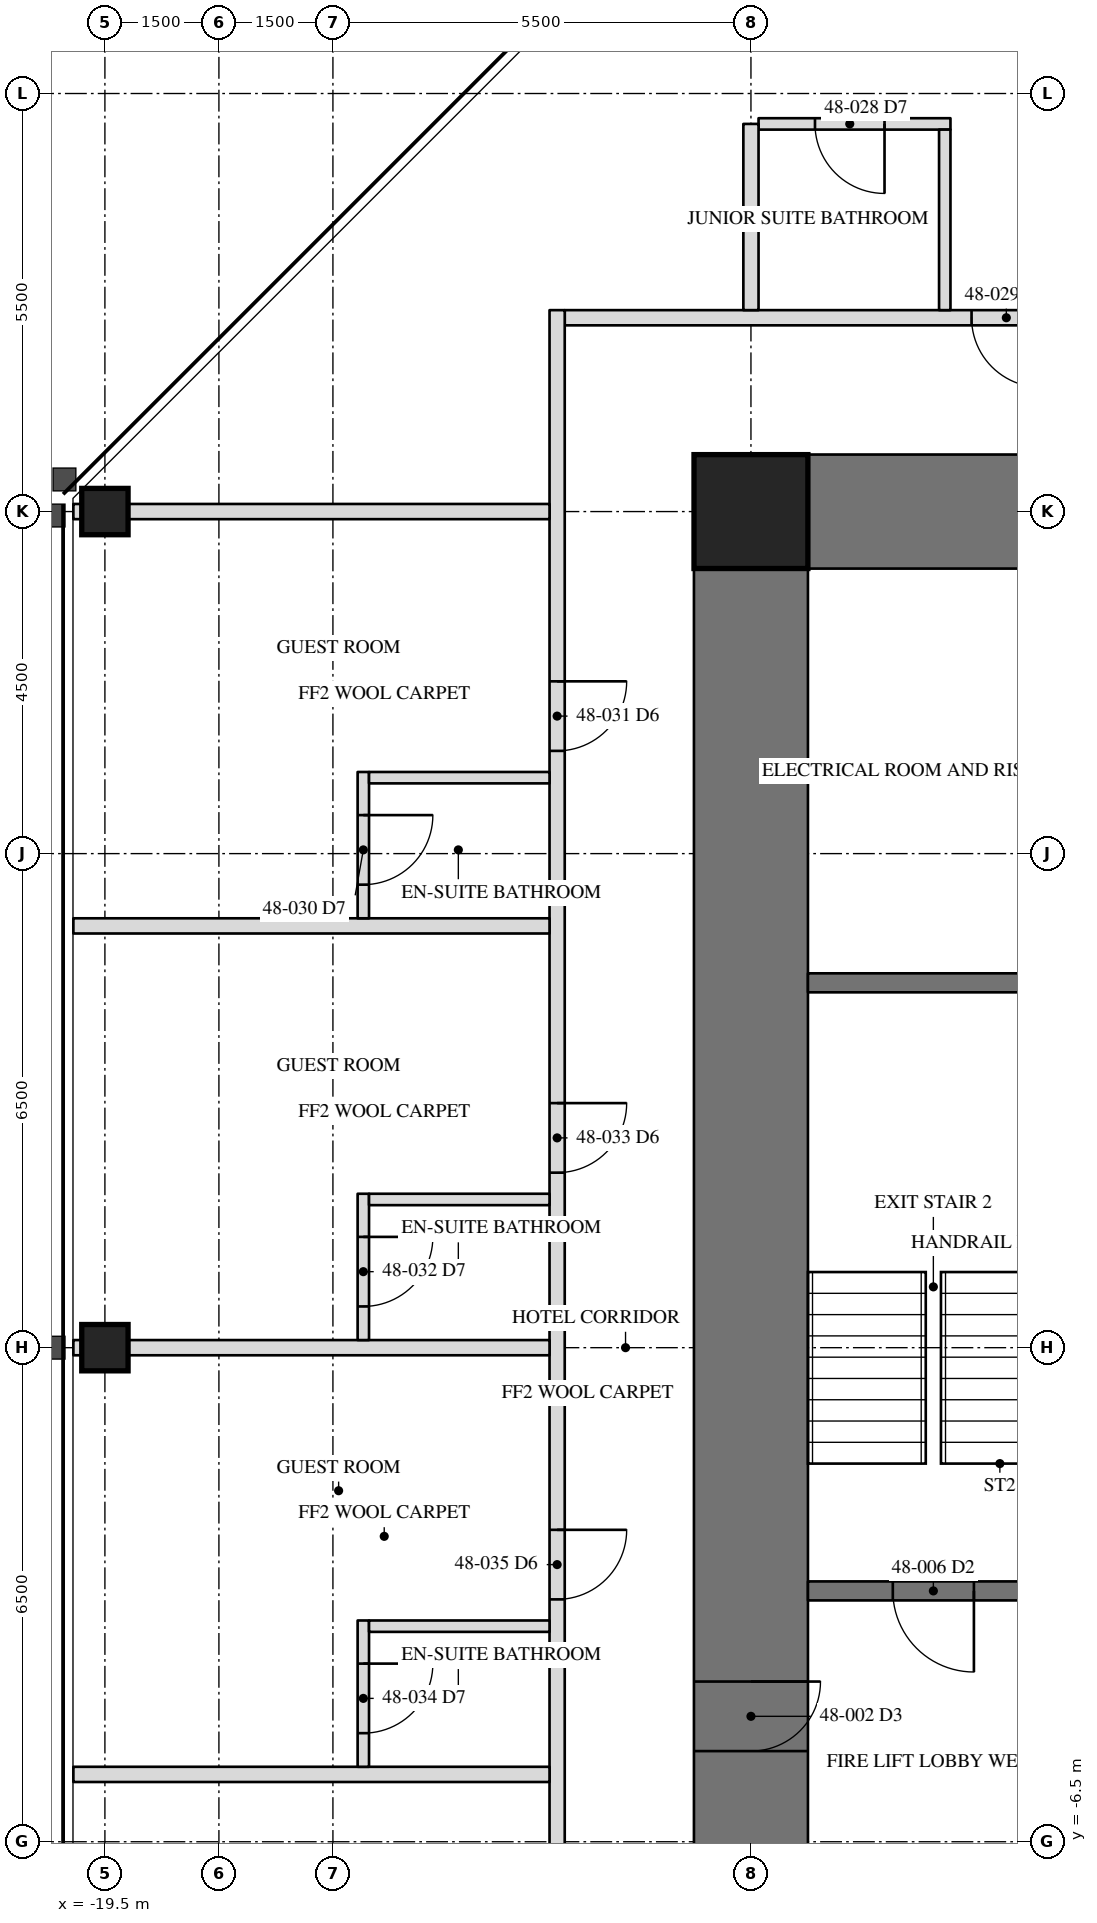
"""IFC4 building model, lengths in metres.
Left out: names, types, materials, properties, quantities, classifications, styles, units other than length and angle.
Written with IfcOpenShell. Run it as: python <this file> out.ifc"""

import sys

from ifc_helpers import new_model, si_unit, direction, frame, frame_2d, origin, origin_2d, place, context, subcontext, project, spatial, rectangle, hollow_rectangle, extrude, element, fill, save


model = new_model("IFC4")
c1 = context("Model", 3, precision=1e-05, world=origin(), true_north=direction((0.0, 1.0)))
c2 = subcontext(c1, "Body", "Model", "MODEL_VIEW")
j1 = project(units=[si_unit("LENGTHUNIT", "METRE"), si_unit("PLANEANGLEUNIT", "RADIAN")], contexts=[c1])
p1 = place(None, origin())
s1 = spatial("IfcSite", under=j1, at=p1, CompositionType="ELEMENT")
p2 = place(p1, origin())
s2 = spatial("IfcBuilding", under=s1, at=p2, CompositionType="ELEMENT")
p3 = place(p2, frame((0.0, 0.0, 204.7)))
s3 = spatial("IfcBuildingStorey", under=s2, at=p3, CompositionType="ELEMENT", Elevation=204.7)
for number, where, z_axis, x_axis in (
    (1, (-19.5, 0.0, 0.0), (0.0, 0.0, 1.0), (0.0, 1.0, 0.0)),
    (2, (-19.5, 11.0, 0.0), (0.0, 0.0, 1.0), (0.0, 1.0, 0.0)),
):
    element("IfcColumn", number, at=place(p3, frame(where, z_axis=z_axis, x_axis=x_axis)), inside=s3, PredefinedType="COLUMN", context=c2, shape_type="SweptSolid", body=[
        extrude(hollow_rectangle(XDim=0.61, YDim=0.61, WallThickness=0.076, at=origin_2d()), origin(), (0.0, 0.0, 1.0), 3.5),
    ])
p4 = place(p3, frame((-11.0, 11.0, 0.0), z_axis=(0.0, 0.0, 1.0), x_axis=(0.0, -1.0, 0.0)))
e3 = element("IfcWall", 3, at=p4, inside=s3, PredefinedType="SHEAR", context=c2, shape_type="SweptSolid", body=[
    extrude(rectangle(XDim=22.0, YDim=1.5, at=frame_2d((11.0, 0.0))), origin(), (0.0, 0.0, 1.0), 3.5),
])
p5 = place(p4, frame((15.393, 0.0, 0.0)))
e4 = element("IfcOpeningElement", 4, at=p5, cuts=e3, PredefinedType="OPENING", context=c2, shape_type="SweptSolid", body=[
    extrude(rectangle(XDim=0.915, YDim=2.134, at=frame_2d((0.458, 1.067))), frame((0.0, 0.76, 0.0), z_axis=(0.0, -1.0, 0.0), x_axis=(1.0, 0.0, 0.0)), (0.0, 0.0, 1.0), 1.52),
])
p6 = place(p3, frame((-6.5, 11.0, 0.0), z_axis=(0.0, 0.0, 1.0), x_axis=(-1.0, 0.0, 0.0)))
e5 = element("IfcWall", 5, at=p6, inside=s3, PredefinedType="SHEAR", context=c2, shape_type="SweptSolid", body=[
    extrude(rectangle(XDim=4.5, YDim=1.5, at=frame_2d((2.25, 0.0))), origin(), (0.0, 0.0, 1.0), 3.5),
])
p7 = place(p3, frame((-11.0, 11.0, 0.0), z_axis=(0.0, 0.0, 1.0), x_axis=(1.0, 0.0, 0.0)))
e6 = element("IfcColumn", 6, at=p7, inside=s3, PredefinedType="COLUMN", context=c2, shape_type="SweptSolid", body=[
    extrude(hollow_rectangle(XDim=1.499, YDim=1.499, WallThickness=0.102, at=origin_2d()), origin(), (0.0, 0.0, 1.0), 3.5),
])
p8 = place(p3, frame((-6.95, 4.8, 0.0), z_axis=(0.0, 0.0, 1.0), x_axis=(-1.0, 0.0, 0.0)))
e7 = element("IfcWall", 7, at=p8, inside=s3, PredefinedType="SOLIDWALL", context=c2, shape_type="SweptSolid", body=[
    extrude(rectangle(XDim=3.3, YDim=0.25, at=frame_2d((1.65, 0.0))), origin(), (0.0, 0.0, 1.0), 3.31),
])
p9 = place(p3, frame((-6.95, -3.2, 0.0), z_axis=(0.0, 0.0, 1.0), x_axis=(-1.0, 0.0, 0.0)))
e8 = element("IfcWall", 8, at=p9, inside=s3, PredefinedType="SOLIDWALL", context=c2, shape_type="SweptSolid", body=[
    extrude(rectangle(XDim=3.3, YDim=0.25, at=frame_2d((1.65, 0.0))), origin(), (0.0, 0.0, 1.0), 3.31),
])
p10 = place(p9, frame((1.116, 0.0, 0.0)))
e9 = element("IfcOpeningElement", 9, at=p10, cuts=e8, PredefinedType="OPENING", context=c2, shape_type="SweptSolid", body=[
    extrude(rectangle(XDim=1.067, YDim=2.134, at=frame_2d((0.533, 1.067))), frame((0.0, 0.135, 0.0), z_axis=(0.0, -1.0, 0.0), x_axis=(1.0, 0.0, 0.0)), (0.0, 0.0, 1.0), 0.27),
])
p11 = place(p3, frame((13.65, 13.55, 0.0), z_axis=(0.0, 0.0, 1.0), x_axis=(-1.0, 0.0, 0.0)))
e10 = element("IfcWall", 10, at=p11, inside=s3, PredefinedType="PARTITIONING", context=c2, shape_type="SweptSolid", body=[
    extrude(rectangle(XDim=27.1, YDim=0.2, at=frame_2d((13.55, 0.0))), origin(), (0.0, 0.0, 1.0), 3.31),
])
p12 = place(p11, frame((7.058, 0.0, 0.0)))
e11 = element("IfcOpeningElement", 11, at=p12, cuts=e10, PredefinedType="OPENING", context=c2, shape_type="SweptSolid", body=[
    extrude(rectangle(XDim=0.915, YDim=2.134, at=frame_2d((0.458, 1.067))), frame((0.0, 0.11, 0.0), z_axis=(0.0, -1.0, 0.0), x_axis=(1.0, 0.0, 0.0)), (0.0, 0.0, 1.0), 0.22),
])
p13 = place(p11, frame((13.24, 0.0, 0.0)))
e12 = element("IfcOpeningElement", 12, at=p13, cuts=e10, PredefinedType="OPENING", context=c2, shape_type="SweptSolid", body=[
    extrude(rectangle(XDim=0.915, YDim=2.134, at=frame_2d((0.458, 1.067))), frame((0.0, 0.11, 0.0), z_axis=(0.0, -1.0, 0.0), x_axis=(1.0, 0.0, 0.0)), (0.0, 0.0, 1.0), 0.22),
])
p14 = place(p11, frame((20.833, 0.0, 0.0)))
e13 = element("IfcOpeningElement", 13, at=p14, cuts=e10, PredefinedType="OPENING", context=c2, shape_type="SweptSolid", body=[
    extrude(rectangle(XDim=0.915, YDim=2.134, at=frame_2d((0.458, 1.067))), frame((0.0, 0.11, 0.0), z_axis=(0.0, -1.0, 0.0), x_axis=(1.0, 0.0, 0.0)), (0.0, 0.0, 1.0), 0.22),
])
p15 = place(p3, frame((-13.55, 13.65, 0.0), z_axis=(0.0, 0.0, 1.0), x_axis=(0.0, -1.0, 0.0)))
e14 = element("IfcWall", 14, at=p15, inside=s3, PredefinedType="PARTITIONING", context=c2, shape_type="SweptSolid", body=[
    extrude(rectangle(XDim=27.1, YDim=0.2, at=frame_2d((13.55, 0.0))), origin(), (0.0, 0.0, 1.0), 3.31),
])
p16 = place(p15, frame((4.884, 0.0, 0.0)))
e15 = element("IfcOpeningElement", 15, at=p16, cuts=e14, PredefinedType="OPENING", context=c2, shape_type="SweptSolid", body=[
    extrude(rectangle(XDim=0.915, YDim=2.134, at=frame_2d((0.458, 1.067))), frame((0.0, 0.11, 0.0), z_axis=(0.0, -1.0, 0.0), x_axis=(1.0, 0.0, 0.0)), (0.0, 0.0, 1.0), 0.22),
])
p17 = place(p15, frame((10.433, 0.0, 0.0)))
e16 = element("IfcOpeningElement", 16, at=p17, cuts=e14, PredefinedType="OPENING", context=c2, shape_type="SweptSolid", body=[
    extrude(rectangle(XDim=0.915, YDim=2.134, at=frame_2d((0.458, 1.067))), frame((0.0, 0.11, 0.0), z_axis=(0.0, -1.0, 0.0), x_axis=(1.0, 0.0, 0.0)), (0.0, 0.0, 1.0), 0.22),
])
p18 = place(p15, frame((16.046, 0.0, 0.0)))
e17 = element("IfcOpeningElement", 17, at=p18, cuts=e14, PredefinedType="OPENING", context=c2, shape_type="SweptSolid", body=[
    extrude(rectangle(XDim=0.915, YDim=2.134, at=frame_2d((0.458, 1.067))), frame((0.0, 0.11, 0.0), z_axis=(0.0, -1.0, 0.0), x_axis=(1.0, 0.0, 0.0)), (0.0, 0.0, 1.0), 0.22),
])
p19 = place(p15, frame((21.433, 0.0, 0.0)))
e18 = element("IfcOpeningElement", 18, at=p19, cuts=e14, PredefinedType="OPENING", context=c2, shape_type="SweptSolid", body=[
    extrude(rectangle(XDim=0.915, YDim=2.134, at=frame_2d((0.458, 1.067))), frame((0.0, 0.11, 0.0), z_axis=(0.0, -1.0, 0.0), x_axis=(1.0, 0.0, 0.0)), (0.0, 0.0, 1.0), 0.22),
])
p20 = place(p3, frame((-8.375, 16.1, 0.0), z_axis=(0.0, 0.0, 1.0), x_axis=(-1.0, 0.0, 0.0)))
e19 = element("IfcWall", 19, at=p20, inside=s3, PredefinedType="PARTITIONING", context=c2, shape_type="SweptSolid", body=[
    extrude(rectangle(XDim=2.525, YDim=0.15, at=frame_2d((1.262, 0.0))), origin(), (0.0, 0.0, 1.0), 3.31),
])
p21 = place(p20, frame((0.867, 0.0, 0.0)))
e20 = element("IfcOpeningElement", 20, at=p21, cuts=e19, PredefinedType="OPENING", context=c2, shape_type="SweptSolid", body=[
    extrude(rectangle(XDim=0.915, YDim=2.032, at=frame_2d((0.458, 1.016))), frame((0.0, 0.085, 0.0), z_axis=(0.0, -1.0, 0.0), x_axis=(1.0, 0.0, 0.0)), (0.0, 0.0, 1.0), 0.17),
])
p22 = place(p3, frame((-8.45, 13.65, 0.0), z_axis=(0.0, 0.0, 1.0), x_axis=(0.0, 1.0, 0.0)))
e21 = element("IfcWall", 21, at=p22, inside=s3, PredefinedType="PARTITIONING", context=c2, shape_type="SweptSolid", body=[
    extrude(rectangle(XDim=2.375, YDim=0.15, at=frame_2d((1.188, 0.0))), origin(), (0.0, 0.0, 1.0), 3.31),
])
p23 = place(p3, frame((-11.0, 13.65, 0.0), z_axis=(0.0, 0.0, 1.0), x_axis=(0.0, 1.0, 0.0)))
e22 = element("IfcWall", 22, at=p23, inside=s3, PredefinedType="PARTITIONING", context=c2, shape_type="SweptSolid", body=[
    extrude(rectangle(XDim=2.45, YDim=0.2, at=frame_2d((1.225, 0.0))), origin(), (0.0, 0.0, 1.0), 2.802),
])
p24 = place(p3, frame((-13.65, 11.0, 0.0), z_axis=(0.0, 0.0, 1.0), x_axis=(-1.0, 0.0, 0.0)))
e23 = element("IfcWall", 23, at=p24, inside=s3, PredefinedType="PARTITIONING", context=c2, shape_type="SweptSolid", body=[
    extrude(rectangle(XDim=6.265, YDim=0.2, at=frame_2d((3.133, 0.0))), origin(), (0.0, 0.0, 1.0), 2.802),
])
p25 = place(p3, frame((-13.65, 5.549, 0.0), z_axis=(0.0, 0.0, 1.0), x_axis=(-1.0, 0.0, 0.0)))
e24 = element("IfcWall", 24, at=p25, inside=s3, PredefinedType="PARTITIONING", context=c2, shape_type="SweptSolid", body=[
    extrude(rectangle(XDim=6.265, YDim=0.2, at=frame_2d((3.133, 0.0))), origin(), (0.0, 0.0, 1.0), 3.31),
])
p26 = place(p3, frame((-13.65, 0.0, 0.0), z_axis=(0.0, 0.0, 1.0), x_axis=(-1.0, 0.0, 0.0)))
e25 = element("IfcWall", 25, at=p26, inside=s3, PredefinedType="PARTITIONING", context=c2, shape_type="SweptSolid", body=[
    extrude(rectangle(XDim=6.265, YDim=0.2, at=frame_2d((3.133, 0.0))), origin(), (0.0, 0.0, 1.0), 2.802),
])
p27 = place(p3, frame((-13.65, -5.614, 0.0), z_axis=(0.0, 0.0, 1.0), x_axis=(-1.0, 0.0, 0.0)))
e26 = element("IfcWall", 26, at=p27, inside=s3, PredefinedType="PARTITIONING", context=c2, shape_type="SweptSolid", body=[
    extrude(rectangle(XDim=6.265, YDim=0.2, at=frame_2d((3.133, 0.0))), origin(), (0.0, 0.0, 1.0), 3.31),
])
p28 = place(p3, frame((-16.1, 7.574, 0.0), z_axis=(0.0, 0.0, 1.0), x_axis=(0.0, -1.0, 0.0)))
e27 = element("IfcWall", 27, at=p28, inside=s3, PredefinedType="PARTITIONING", context=c2, shape_type="SweptSolid", body=[
    extrude(rectangle(XDim=1.925, YDim=0.15, at=frame_2d((0.962, 0.0))), origin(), (0.0, 0.0, 1.0), 3.31),
])
p29 = place(p28, frame((0.567, 0.0, 0.0)))
e28 = element("IfcOpeningElement", 28, at=p29, cuts=e27, PredefinedType="OPENING", context=c2, shape_type="SweptSolid", body=[
    extrude(rectangle(XDim=0.915, YDim=2.032, at=frame_2d((0.458, 1.016))), frame((0.0, 0.085, 0.0), z_axis=(0.0, -1.0, 0.0), x_axis=(1.0, 0.0, 0.0)), (0.0, 0.0, 1.0), 0.17),
])
p30 = place(p3, frame((-13.65, 7.499, 0.0), z_axis=(0.0, 0.0, 1.0), x_axis=(-1.0, 0.0, 0.0)))
e29 = element("IfcWall", 29, at=p30, inside=s3, PredefinedType="PARTITIONING", context=c2, shape_type="SweptSolid", body=[
    extrude(rectangle(XDim=2.375, YDim=0.15, at=frame_2d((1.188, 0.0))), origin(), (0.0, 0.0, 1.0), 3.31),
])
p31 = place(p3, frame((-16.1, 2.025, 0.0), z_axis=(0.0, 0.0, 1.0), x_axis=(0.0, -1.0, 0.0)))
e30 = element("IfcWall", 30, at=p31, inside=s3, PredefinedType="PARTITIONING", context=c2, shape_type="SweptSolid", body=[
    extrude(rectangle(XDim=1.925, YDim=0.15, at=frame_2d((0.962, 0.0))), origin(), (0.0, 0.0, 1.0), 3.31),
])
p32 = place(p31, frame((0.567, 0.0, 0.0)))
e31 = element("IfcOpeningElement", 31, at=p32, cuts=e30, PredefinedType="OPENING", context=c2, shape_type="SweptSolid", body=[
    extrude(rectangle(XDim=0.915, YDim=2.032, at=frame_2d((0.458, 1.016))), frame((0.0, 0.085, 0.0), z_axis=(0.0, -1.0, 0.0), x_axis=(1.0, 0.0, 0.0)), (0.0, 0.0, 1.0), 0.17),
])
p33 = place(p3, frame((-13.65, 1.95, 0.0), z_axis=(0.0, 0.0, 1.0), x_axis=(-1.0, 0.0, 0.0)))
e32 = element("IfcWall", 32, at=p33, inside=s3, PredefinedType="PARTITIONING", context=c2, shape_type="SweptSolid", body=[
    extrude(rectangle(XDim=2.375, YDim=0.15, at=frame_2d((1.188, 0.0))), origin(), (0.0, 0.0, 1.0), 3.31),
])
p34 = place(p3, frame((-16.1, -3.589, 0.0), z_axis=(0.0, 0.0, 1.0), x_axis=(0.0, -1.0, 0.0)))
e33 = element("IfcWall", 33, at=p34, inside=s3, PredefinedType="PARTITIONING", context=c2, shape_type="SweptSolid", body=[
    extrude(rectangle(XDim=1.925, YDim=0.15, at=frame_2d((0.962, 0.0))), origin(), (0.0, 0.0, 1.0), 3.31),
])
p35 = place(p34, frame((0.567, 0.0, 0.0)))
e34 = element("IfcOpeningElement", 34, at=p35, cuts=e33, PredefinedType="OPENING", context=c2, shape_type="SweptSolid", body=[
    extrude(rectangle(XDim=0.915, YDim=2.032, at=frame_2d((0.458, 1.016))), frame((0.0, 0.085, 0.0), z_axis=(0.0, -1.0, 0.0), x_axis=(1.0, 0.0, 0.0)), (0.0, 0.0, 1.0), 0.17),
])
p36 = place(p3, frame((-13.65, -3.664, 0.0), z_axis=(0.0, 0.0, 1.0), x_axis=(-1.0, 0.0, 0.0)))
e35 = element("IfcWall", 35, at=p36, inside=s3, PredefinedType="PARTITIONING", context=c2, shape_type="SweptSolid", body=[
    extrude(rectangle(XDim=2.375, YDim=0.15, at=frame_2d((1.188, 0.0))), origin(), (0.0, 0.0, 1.0), 2.703),
])
p37 = place(p5, origin())
e36 = element("IfcDoor", 36, at=p37, inside=s3, OperationType="SINGLE_SWING_RIGHT", PredefinedType="DOOR", context=c2, shape_type="SweptSolid", body=[
    extrude(rectangle(XDim=0.915, YDim=2.134, at=frame_2d((0.458, 1.067))), frame((0.0, -0.675, 0.0), z_axis=(0.0, -1.0, 0.0), x_axis=(1.0, 0.0, 0.0)), (0.0, 0.0, 1.0), 0.05),
])
fill(e4, e36)
p38 = place(p10, origin())
e37 = element("IfcDoor", 37, at=p38, inside=s3, OperationType="SINGLE_SWING_LEFT", PredefinedType="DOOR", context=c2, shape_type="SweptSolid", body=[
    extrude(rectangle(XDim=1.067, YDim=2.134, at=frame_2d((0.533, 1.067))), frame((0.0, 0.025, 0.0), z_axis=(0.0, -1.0, 0.0), x_axis=(1.0, 0.0, 0.0)), (0.0, 0.0, 1.0), 0.05),
])
fill(e9, e37)
p39 = place(p21, origin())
e38 = element("IfcDoor", 38, at=p39, inside=s3, OperationType="SINGLE_SWING_LEFT", PredefinedType="DOOR", context=c2, shape_type="SweptSolid", body=[
    extrude(rectangle(XDim=0.915, YDim=2.032, at=frame_2d((0.458, 1.016))), frame((0.0, 0.025, 0.0), z_axis=(0.0, -1.0, 0.0), x_axis=(1.0, 0.0, 0.0)), (0.0, 0.0, 1.0), 0.05),
])
fill(e20, e38)
p40 = place(p14, origin())
e39 = element("IfcDoor", 39, at=p40, inside=s3, OperationType="SINGLE_SWING_LEFT", PredefinedType="DOOR", context=c2, shape_type="SweptSolid", body=[
    extrude(rectangle(XDim=0.915, YDim=2.134, at=frame_2d((0.458, 1.067))), frame((0.0, 0.025, 0.0), z_axis=(0.0, -1.0, 0.0), x_axis=(1.0, 0.0, 0.0)), (0.0, 0.0, 1.0), 0.05),
])
fill(e13, e39)
p41 = place(p29, origin())
e40 = element("IfcDoor", 40, at=p41, inside=s3, OperationType="SINGLE_SWING_LEFT", PredefinedType="DOOR", context=c2, shape_type="SweptSolid", body=[
    extrude(rectangle(XDim=0.915, YDim=2.032, at=frame_2d((0.458, 1.016))), frame((0.0, 0.025, 0.0), z_axis=(0.0, -1.0, 0.0), x_axis=(1.0, 0.0, 0.0)), (0.0, 0.0, 1.0), 0.05),
])
fill(e28, e40)
p42 = place(p16, origin())
e41 = element("IfcDoor", 41, at=p42, inside=s3, OperationType="SINGLE_SWING_LEFT", PredefinedType="DOOR", context=c2, shape_type="SweptSolid", body=[
    extrude(rectangle(XDim=0.915, YDim=2.134, at=frame_2d((0.458, 1.067))), frame((0.0, 0.025, 0.0), z_axis=(0.0, -1.0, 0.0), x_axis=(1.0, 0.0, 0.0)), (0.0, 0.0, 1.0), 0.05),
])
fill(e15, e41)
p43 = place(p32, origin())
e42 = element("IfcDoor", 42, at=p43, inside=s3, OperationType="SINGLE_SWING_LEFT", PredefinedType="DOOR", context=c2, shape_type="SweptSolid", body=[
    extrude(rectangle(XDim=0.915, YDim=2.032, at=frame_2d((0.458, 1.016))), frame((0.0, 0.025, 0.0), z_axis=(0.0, -1.0, 0.0), x_axis=(1.0, 0.0, 0.0)), (0.0, 0.0, 1.0), 0.05),
])
fill(e31, e42)
p44 = place(p17, origin())
e43 = element("IfcDoor", 43, at=p44, inside=s3, OperationType="SINGLE_SWING_LEFT", PredefinedType="DOOR", context=c2, shape_type="SweptSolid", body=[
    extrude(rectangle(XDim=0.915, YDim=2.134, at=frame_2d((0.458, 1.067))), frame((0.0, 0.025, 0.0), z_axis=(0.0, -1.0, 0.0), x_axis=(1.0, 0.0, 0.0)), (0.0, 0.0, 1.0), 0.05),
])
fill(e16, e43)
p45 = place(p35, origin())
e44 = element("IfcDoor", 44, at=p45, inside=s3, OperationType="SINGLE_SWING_LEFT", PredefinedType="DOOR", context=c2, shape_type="SweptSolid", body=[
    extrude(rectangle(XDim=0.915, YDim=2.032, at=frame_2d((0.458, 1.016))), frame((0.0, 0.025, 0.0), z_axis=(0.0, -1.0, 0.0), x_axis=(1.0, 0.0, 0.0)), (0.0, 0.0, 1.0), 0.05),
])
fill(e34, e44)
p46 = place(p18, origin())
e45 = element("IfcDoor", 45, at=p46, inside=s3, OperationType="SINGLE_SWING_LEFT", PredefinedType="DOOR", context=c2, shape_type="SweptSolid", body=[
    extrude(rectangle(XDim=0.915, YDim=2.134, at=frame_2d((0.458, 1.067))), frame((0.0, 0.025, 0.0), z_axis=(0.0, -1.0, 0.0), x_axis=(1.0, 0.0, 0.0)), (0.0, 0.0, 1.0), 0.05),
])
fill(e17, e45)
save(model, sys.argv[1])
